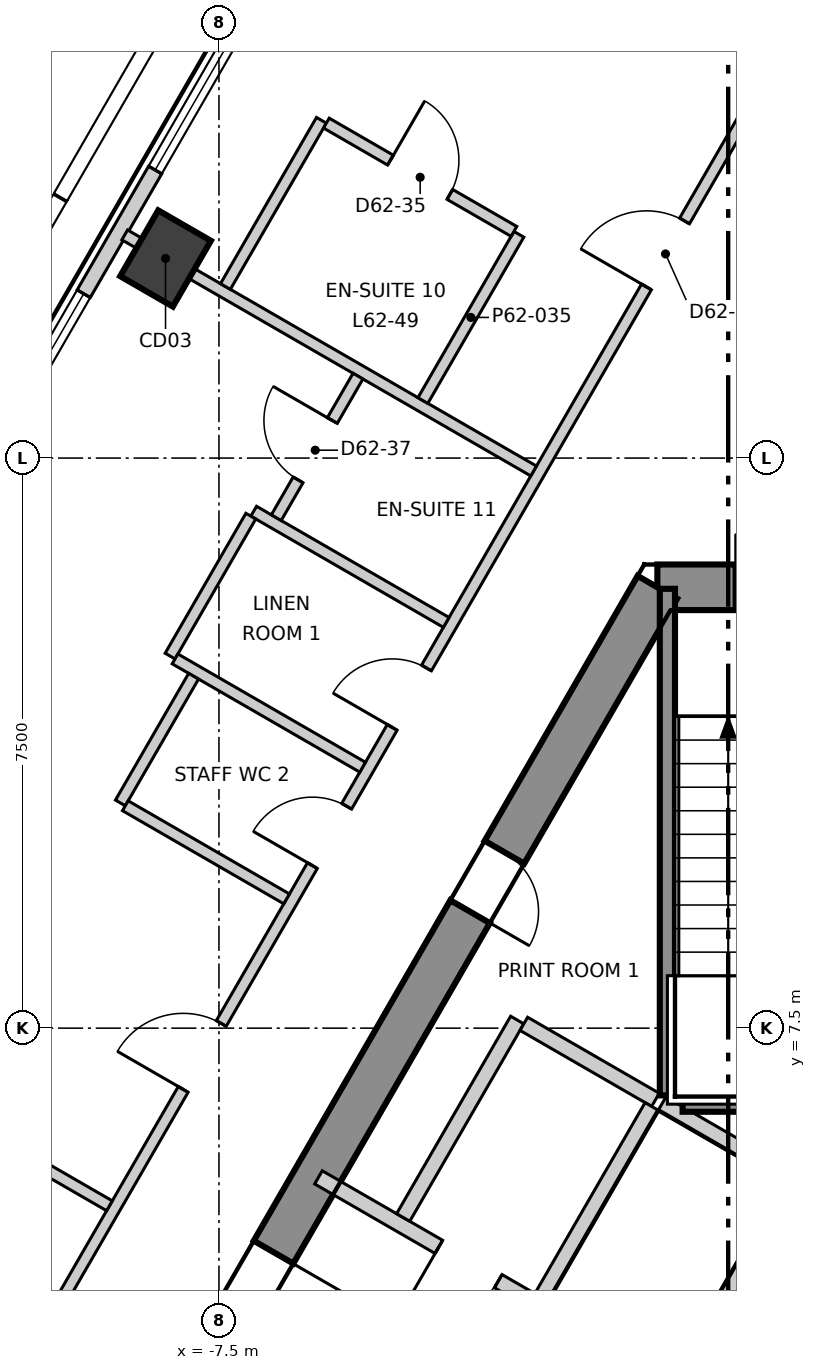
"""IFC4 building model, lengths in metres.
Left out: names, types, materials, properties, quantities, classifications, styles, units other than length and angle.
Written with IfcOpenShell. Run it as: python <this file> out.ifc"""

import sys

from ifc_helpers import new_model, si_unit, direction, frame, frame_2d, origin, origin_2d, place, context, subcontext, project, spatial, polyline, rectangle, outline, extrude, element, fill, save


model = new_model("IFC4")
c1 = context("Model", 3, precision=1e-05, world=origin(), true_north=direction((0.0, 1.0)))
c2 = subcontext(c1, "Body", "Model", "MODEL_VIEW")
j1 = project(units=[si_unit("LENGTHUNIT", "METRE"), si_unit("PLANEANGLEUNIT", "RADIAN")], contexts=[c1])
p1 = place(None, origin())
s1 = spatial("IfcSite", under=j1, at=p1, CompositionType="ELEMENT")
p2 = place(p1, origin())
s2 = spatial("IfcBuilding", under=s1, at=p2, CompositionType="ELEMENT")
p3 = place(p2, frame((0.0, 0.0, 268.3)))
s3 = spatial("IfcBuildingStorey", under=s2, at=p3, CompositionType="ELEMENT", Elevation=268.3)
p4 = place(p3, frame((1.732, 13.3, -0.3), z_axis=(0.0, 0.0, 1.0), x_axis=(-1.0, 0.0, 0.0)))
e1 = element("IfcWall", 1, at=p4, inside=s3, PredefinedType="SHEAR", context=c2, shape_type="SweptSolid", body=[
    extrude(outline(polyline([(-0.173, -0.3), (1.732, -0.3), (3.637, -0.3), (3.291, 0.3), (1.732, 0.3), (0.173, 0.3), (-0.173, -0.3)])), origin(), (0.0, 0.0, 1.0), 3.6),
])
p5 = place(p4, frame((1.032, 0.0, 0.3)))
e2 = element("IfcOpeningElement", 2, at=p5, cuts=e1, PredefinedType="OPENING", context=c2, shape_type="SweptSolid", body=[
    extrude(rectangle(XDim=1.4, YDim=2.1, at=frame_2d((0.7, 1.05))), frame((0.0, 0.31, 0.0), z_axis=(0.0, -1.0, 0.0), x_axis=(1.0, 0.0, 0.0)), (0.0, 0.0, 1.0), 0.62),
])
p6 = place(p3, frame((-1.732, 13.3, -0.3), z_axis=(0.0, 0.0, 1.0), x_axis=(-0.500000539815, -0.866025092122, 0.0)))
e3 = element("IfcWall", 3, at=p6, inside=s3, PredefinedType="SHEAR", context=c2, shape_type="SweptSolid", body=[
    extrude(outline(polyline([(-0.173, -0.3), (1.795, -0.3), (3.763, -0.3), (5.732, -0.3), (7.7, -0.3), (9.668, -0.301), (11.637, -0.301), (13.605, -0.301), (15.573, -0.301), (17.542, -0.301), (19.51, -0.301), (21.478, -0.301), (21.131, 0.3), (19.226, 0.3), (17.321, 0.3), (15.415, 0.3), (13.51, 0.3), (11.605, 0.3), (9.699, 0.3), (7.794, 0.3), (5.889, 0.3), (3.984, 0.3), (2.078, 0.3), (0.173, 0.3), (-0.173, -0.3)])), origin(), (0.0, 0.0, 1.0), 3.6),
])
p7 = place(p6, frame((10.102, 0.0, 0.3)))
e4 = element("IfcOpeningElement", 4, at=p7, cuts=e3, PredefinedType="OPENING", context=c2, shape_type="SweptSolid", body=[
    extrude(rectangle(XDim=1.1, YDim=2.1, at=frame_2d((0.55, 1.05))), frame((0.0, 0.31, 0.0), z_axis=(0.0, -1.0, 0.0), x_axis=(1.0, 0.0, 0.0)), (0.0, 0.0, 1.0), 0.621),
])
p8 = place(p6, frame((16.378, 0.0, 0.3)))
e5 = element("IfcOpeningElement", 5, at=p8, cuts=e3, PredefinedType="OPENING", context=c2, shape_type="SweptSolid", body=[
    extrude(rectangle(XDim=0.9, YDim=2.1, at=frame_2d((0.45, 1.05))), frame((0.0, 0.31, 0.0), z_axis=(0.0, -1.0, 0.0), x_axis=(1.0, 0.0, 0.0)), (0.0, 0.0, 1.0), 0.621),
])
p9 = place(p6, frame((4.026, 0.0, 0.3)))
e6 = element("IfcOpeningElement", 6, at=p9, cuts=e3, PredefinedType="OPENING", context=c2, shape_type="SweptSolid", body=[
    extrude(rectangle(XDim=0.9, YDim=2.1, at=frame_2d((0.45, 1.05))), frame((0.0, 0.31, 0.0), z_axis=(0.0, -1.0, 0.0), x_axis=(1.0, 0.0, 0.0)), (0.0, 0.0, 1.0), 0.621),
])
p10 = place(p3, frame((-8.203, 17.626, -0.3), z_axis=(0.0, 0.0, 1.0), x_axis=(0.5, 0.866025403784, 0.0)))
e7 = element("IfcColumn", 7, at=p10, inside=s3, PredefinedType="COLUMN", context=c2, shape_type="SweptSolid", body=[
    extrude(rectangle(XDim=1.0, YDim=0.8, at=origin_2d()), origin(), (0.0, 0.0, 1.0), 3.6),
])
p11 = place(p3, frame((-2.577, 28.771, 0.0), z_axis=(0.0, 0.0, 1.0), x_axis=(-0.49999909388, -0.866025926932, 0.0)))
e8 = element("IfcWall", 8, at=p11, inside=s3, PredefinedType="ELEMENTEDWALL", context=c2, shape_type="SweptSolid", body=[
    extrude(rectangle(XDim=47.236, YDim=0.2, at=frame_2d((23.618, 0.0))), origin(), (0.0, 0.0, 1.0), 3.3),
])
p12 = place(p11, frame((2.243, 0.0, 0.9)))
e9 = element("IfcOpeningElement", 9, at=p12, cuts=e8, PredefinedType="OPENING", context=c2, shape_type="SweptSolid", body=[
    extrude(rectangle(XDim=3.7, YDim=2.2, at=frame_2d((1.85, 1.1))), frame((0.0, 0.11, 0.0), z_axis=(0.0, -1.0, 0.0), x_axis=(1.0, 0.0, 0.0)), (0.0, 0.0, 1.0), 0.22),
])
p13 = place(p11, frame((7.824, 0.0, 0.9)))
e10 = element("IfcOpeningElement", 10, at=p13, cuts=e8, PredefinedType="OPENING", context=c2, shape_type="SweptSolid", body=[
    extrude(rectangle(XDim=3.7, YDim=2.2, at=frame_2d((1.85, 1.1))), frame((0.0, 0.11, 0.0), z_axis=(0.0, -1.0, 0.0), x_axis=(1.0, 0.0, 0.0)), (0.0, 0.0, 1.0), 0.22),
])
p14 = place(p11, frame((13.406, 0.0, 0.9)))
e11 = element("IfcOpeningElement", 11, at=p14, cuts=e8, PredefinedType="OPENING", context=c2, shape_type="SweptSolid", body=[
    extrude(rectangle(XDim=3.7, YDim=2.2, at=frame_2d((1.85, 1.1))), frame((0.0, 0.11, 0.0), z_axis=(0.0, -1.0, 0.0), x_axis=(1.0, 0.0, 0.0)), (0.0, 0.0, 1.0), 0.22),
])
p15 = place(p11, frame((18.987, 0.0, 0.9)))
e12 = element("IfcOpeningElement", 12, at=p15, cuts=e8, PredefinedType="OPENING", context=c2, shape_type="SweptSolid", body=[
    extrude(rectangle(XDim=3.7, YDim=2.2, at=frame_2d((1.85, 1.1))), frame((0.0, 0.11, 0.0), z_axis=(0.0, -1.0, 0.0), x_axis=(1.0, 0.0, 0.0)), (0.0, 0.0, 1.0), 0.22),
])
p16 = place(p11, frame((24.569, 0.0, 0.9)))
e13 = element("IfcOpeningElement", 13, at=p16, cuts=e8, PredefinedType="OPENING", context=c2, shape_type="SweptSolid", body=[
    extrude(rectangle(XDim=3.7, YDim=2.2, at=frame_2d((1.85, 1.1))), frame((0.0, 0.11, 0.0), z_axis=(0.0, -1.0, 0.0), x_axis=(1.0, 0.0, 0.0)), (0.0, 0.0, 1.0), 0.22),
])
p17 = place(p11, frame((30.15, 0.0, 0.9)))
e14 = element("IfcOpeningElement", 14, at=p17, cuts=e8, PredefinedType="OPENING", context=c2, shape_type="SweptSolid", body=[
    extrude(rectangle(XDim=3.7, YDim=2.2, at=frame_2d((1.85, 1.1))), frame((0.0, 0.11, 0.0), z_axis=(0.0, -1.0, 0.0), x_axis=(1.0, 0.0, 0.0)), (0.0, 0.0, 1.0), 0.22),
])
p18 = place(p11, frame((35.731, 0.0, 0.9)))
e15 = element("IfcOpeningElement", 15, at=p18, cuts=e8, PredefinedType="OPENING", context=c2, shape_type="SweptSolid", body=[
    extrude(rectangle(XDim=3.7, YDim=2.2, at=frame_2d((1.85, 1.1))), frame((0.0, 0.11, 0.0), z_axis=(0.0, -1.0, 0.0), x_axis=(1.0, 0.0, 0.0)), (0.0, 0.0, 1.0), 0.22),
])
p19 = place(p11, frame((41.313, 0.0, 0.9)))
e16 = element("IfcOpeningElement", 16, at=p19, cuts=e8, PredefinedType="OPENING", context=c2, shape_type="SweptSolid", body=[
    extrude(rectangle(XDim=3.7, YDim=2.2, at=frame_2d((1.85, 1.1))), frame((0.0, 0.11, 0.0), z_axis=(0.0, -1.0, 0.0), x_axis=(1.0, 0.0, 0.0)), (0.0, 0.0, 1.0), 0.22),
])
p20 = place(p3, frame((-17.678, -10.12, 0.0), z_axis=(0.0, 0.0, 1.0), x_axis=(0.49998824015, 0.86603219323, 0.0)))
e17 = element("IfcWall", 17, at=p20, inside=s3, PredefinedType="PARTITIONING", context=c2, shape_type="SweptSolid", body=[
    extrude(rectangle(XDim=35.357, YDim=0.15, at=frame_2d((17.678, 0.0))), origin(), (0.0, 0.0, 1.0), 3.3),
])
p21 = place(p20, frame((31.607, 0.0, 0.0)))
e18 = element("IfcOpeningElement", 18, at=p21, cuts=e17, PredefinedType="OPENING", context=c2, shape_type="SweptSolid", body=[
    extrude(rectangle(XDim=1.0, YDim=2.1, at=frame_2d((0.5, 1.05))), frame((0.0, 0.085, 0.0), z_axis=(0.0, -1.0, 0.0), x_axis=(1.0, 0.0, 0.0)), (0.0, 0.0, 1.0), 0.17),
])
p22 = place(p20, frame((19.416, 0.0, 0.0)))
e19 = element("IfcOpeningElement", 19, at=p22, cuts=e17, PredefinedType="OPENING", context=c2, shape_type="SweptSolid", body=[
    extrude(rectangle(XDim=1.0, YDim=2.1, at=frame_2d((0.5, 1.05))), frame((0.0, 0.085, 0.0), z_axis=(0.0, -1.0, 0.0), x_axis=(1.0, 0.0, 0.0)), (0.0, 0.0, 1.0), 0.17),
])
p23 = place(p20, frame((24.916, 0.0, 0.0)))
e20 = element("IfcOpeningElement", 20, at=p23, cuts=e17, PredefinedType="OPENING", context=c2, shape_type="SweptSolid", body=[
    extrude(rectangle(XDim=0.9, YDim=2.1, at=frame_2d((0.45, 1.05))), frame((0.0, 0.085, 0.0), z_axis=(0.0, -1.0, 0.0), x_axis=(1.0, 0.0, 0.0)), (0.0, 0.0, 1.0), 0.17),
])
p24 = place(p20, frame((22.816, 0.0, 0.0)))
e21 = element("IfcOpeningElement", 21, at=p24, cuts=e17, PredefinedType="OPENING", context=c2, shape_type="SweptSolid", body=[
    extrude(rectangle(XDim=0.9, YDim=2.1, at=frame_2d((0.45, 1.05))), frame((0.0, 0.085, 0.0), z_axis=(0.0, -1.0, 0.0), x_axis=(1.0, 0.0, 0.0)), (0.0, 0.0, 1.0), 0.17),
])
p25 = place(p20, frame((14.654, 0.0, 0.0)))
e22 = element("IfcOpeningElement", 22, at=p25, cuts=e17, PredefinedType="OPENING", context=c2, shape_type="SweptSolid", body=[
    extrude(rectangle(XDim=1.0, YDim=2.1, at=frame_2d((0.5, 1.05))), frame((0.0, 0.085, 0.0), z_axis=(0.0, -1.0, 0.0), x_axis=(1.0, 0.0, 0.0)), (0.0, 0.0, 1.0), 0.17),
])
p26 = place(p20, frame((7.672, 0.0, 0.0)))
e23 = element("IfcOpeningElement", 23, at=p26, cuts=e17, PredefinedType="OPENING", context=c2, shape_type="SweptSolid", body=[
    extrude(rectangle(XDim=1.0, YDim=2.1, at=frame_2d((0.5, 1.05))), frame((0.0, 0.085, 0.0), z_axis=(0.0, -1.0, 0.0), x_axis=(1.0, 0.0, 0.0)), (0.0, 0.0, 1.0), 0.17),
])
p27 = place(p20, frame((2.69, 0.0, 0.0)))
e24 = element("IfcOpeningElement", 24, at=p27, cuts=e17, PredefinedType="OPENING", context=c2, shape_type="SweptSolid", body=[
    extrude(rectangle(XDim=1.0, YDim=2.1, at=frame_2d((0.5, 1.05))), frame((0.0, 0.085, 0.0), z_axis=(0.0, -1.0, 0.0), x_axis=(1.0, 0.0, 0.0)), (0.0, 0.0, 1.0), 0.17),
])
p28 = place(p3, frame((-14.321, 8.269, 0.0), z_axis=(0.0, 0.0, 1.0), x_axis=(0.866043575568, -0.499968524226, 0.0)))
e25 = element("IfcWall", 25, at=p28, inside=s3, PredefinedType="PARTITIONING", context=c2, shape_type="SweptSolid", body=[
    extrude(rectangle(XDim=6.212, YDim=0.15, at=frame_2d((3.106, 0.0))), origin(), (0.0, 0.0, 1.0), 2.8),
])
p29 = place(p3, frame((-8.74, 17.936, 0.0), z_axis=(0.0, 0.0, 1.0), x_axis=(0.866033751423, -0.499985541187, 0.0)))
e26 = element("IfcWall", 26, at=p29, inside=s3, PredefinedType="PARTITIONING", context=c2, shape_type="SweptSolid", body=[
    extrude(rectangle(XDim=6.212, YDim=0.15, at=frame_2d((3.106, 0.0))), origin(), (0.0, 0.0, 1.0), 3.3),
])
p30 = place(p3, frame((-7.043, 14.301, 0.0), z_axis=(0.0, 0.0, 1.0), x_axis=(0.865917290158, -0.500187211558, 0.0)))
e27 = element("IfcWall", 27, at=p30, inside=s3, PredefinedType="PARTITIONING", context=c2, shape_type="SweptSolid", body=[
    extrude(rectangle(XDim=2.925, YDim=0.15, at=frame_2d((1.463, 0.0))), origin(), (0.0, 0.0, 1.0), 3.3),
])
p31 = place(p3, frame((-8.143, 12.395, 0.0), z_axis=(0.0, 0.0, 1.0), x_axis=(0.499672732084, 0.866214269573, 0.0)))
e28 = element("IfcWall", 28, at=p31, inside=s3, PredefinedType="PARTITIONING", context=c2, shape_type="SweptSolid", body=[
    extrude(rectangle(XDim=2.125, YDim=0.15, at=frame_2d((1.063, 0.0))), origin(), (0.0, 0.0, 1.0), 3.3),
])
p32 = place(p3, frame((-8.078, 12.358, 0.0), z_axis=(0.0, 0.0, 1.0), x_axis=(0.866020080793, -0.500009219579, 0.0)))
e29 = element("IfcWall", 29, at=p32, inside=s3, PredefinedType="PARTITIONING", context=c2, shape_type="SweptSolid", body=[
    extrude(rectangle(XDim=2.85, YDim=0.15, at=frame_2d((1.425, 0.0))), origin(), (0.0, 0.0, 1.0), 3.3),
])
p33 = place(p3, frame((-8.797, 10.463, 0.0), z_axis=(0.0, 0.0, 1.0), x_axis=(0.500271259635, 0.865868735308, 0.0)))
e30 = element("IfcWall", 30, at=p33, inside=s3, PredefinedType="PARTITIONING", context=c2, shape_type="SweptSolid", body=[
    extrude(rectangle(XDim=1.925, YDim=0.15, at=frame_2d((0.963, 0.0))), origin(), (0.0, 0.0, 1.0), 3.3),
])
p34 = place(p3, frame((-8.732, 10.426, 0.0), z_axis=(0.0, 0.0, 1.0), x_axis=(0.866014668023, -0.500018594424, 0.0)))
e31 = element("IfcWall", 31, at=p34, inside=s3, PredefinedType="PARTITIONING", context=c2, shape_type="SweptSolid", body=[
    extrude(rectangle(XDim=2.45, YDim=0.15, at=frame_2d((1.225, 0.0))), origin(), (0.0, 0.0, 1.0), 3.3),
])
for number, where, z_axis, x_axis in (
    (32, (-4.817, 15.757, 0.0), (0.0, 0.0, 1.0), (0.5, 0.866, 0.0)),
    (33, (-7.415, 17.257, 0.0), (0.0, 0.0, 1.0), (0.5, 0.866, 0.0)),
):
    element("IfcWall", number, at=place(p3, frame(where, z_axis=z_axis, x_axis=x_axis)), inside=s3, PredefinedType="PARTITIONING", context=c2, shape_type="SweptSolid", body=[
        extrude(rectangle(XDim=2.525, YDim=0.15, at=frame_2d((1.263, 0.0))), origin(), (0.0, 0.0, 1.0), 3.3),
    ])
p35 = place(p3, frame((-6.746, 14.216, 0.0), z_axis=(0.0, 0.0, 1.0), x_axis=(0.500095966228, 0.865969990567, 0.0)))
e34 = element("IfcWall", 34, at=p35, inside=s3, PredefinedType="PARTITIONING", context=c2, shape_type="SweptSolid", body=[
    extrude(rectangle(XDim=2.15, YDim=0.15, at=frame_2d((1.075, 0.0))), origin(), (0.0, 0.0, 1.0), 3.3),
])
p36 = place(p35, frame((0.575, 0.0, 0.0)))
e35 = element("IfcOpeningElement", 35, at=p36, cuts=e34, PredefinedType="OPENING", context=c2, shape_type="SweptSolid", body=[
    extrude(rectangle(XDim=0.9, YDim=2.1, at=frame_2d((0.45, 1.05))), frame((0.0, 0.085, 0.0), z_axis=(0.0, -1.0, 0.0), x_axis=(1.0, 0.0, 0.0)), (0.0, 0.0, 1.0), 0.17),
])
p37 = place(p3, frame((-6.087, 19.407, 0.0), z_axis=(0.0, 0.0, 1.0), x_axis=(0.866004402611, -0.500036373335, 0.0)))
e36 = element("IfcWall", 36, at=p37, inside=s3, PredefinedType="PARTITIONING", context=c2, shape_type="SweptSolid", body=[
    extrude(rectangle(XDim=2.85, YDim=0.15, at=frame_2d((1.425, 0.0))), origin(), (0.0, 0.0, 1.0), 3.3),
])
p38 = place(p37, frame((0.975, 0.0, 0.0)))
e37 = element("IfcOpeningElement", 37, at=p38, cuts=e36, PredefinedType="OPENING", context=c2, shape_type="SweptSolid", body=[
    extrude(rectangle(XDim=0.9, YDim=2.1, at=frame_2d((0.45, 1.05))), frame((0.0, 0.085, 0.0), z_axis=(0.0, -1.0, 0.0), x_axis=(1.0, 0.0, 0.0)), (0.0, 0.0, 1.0), 0.17),
])
p39 = place(p3, frame((-6.191, 5.537, 0.0), z_axis=(0.0, 0.0, 1.0), x_axis=(0.866052607023, -0.499952879648, 0.0)))
e38 = element("IfcWall", 38, at=p39, inside=s3, PredefinedType="SOLIDWALL", context=c2, shape_type="SweptSolid", body=[
    extrude(rectangle(XDim=3.332, YDim=0.2, at=frame_2d((1.666, 0.0))), origin(), (0.0, 0.0, 1.0), 3.3),
])
p40 = place(p39, frame((1.83, 0.0, 0.0)))
e39 = element("IfcOpeningElement", 39, at=p40, cuts=e38, PredefinedType="OPENING", context=c2, shape_type="SweptSolid", body=[
    extrude(rectangle(XDim=0.9, YDim=2.1, at=frame_2d((0.45, 1.05))), frame((0.0, 0.11, 0.0), z_axis=(0.0, -1.0, 0.0), x_axis=(1.0, 0.0, 0.0)), (0.0, 0.0, 1.0), 0.22),
])
p41 = place(p3, frame((-5.076, 5.009, 0.0), z_axis=(0.0, 0.0, 1.0), x_axis=(0.50002537861, 0.866010750942, 0.0)))
e40 = element("IfcWall", 40, at=p41, inside=s3, PredefinedType="SOLIDWALL", context=c2, shape_type="SweptSolid", body=[
    extrude(rectangle(XDim=3.0, YDim=0.2, at=frame_2d((1.5, 0.0))), origin(), (0.0, 0.0, 1.0), 3.3),
])
p42 = place(p3, frame((-3.489, 7.557, 0.0), z_axis=(0.0, 0.0, 1.0), x_axis=(0.866010750942, -0.50002537861, 0.0)))
e41 = element("IfcWall", 41, at=p42, inside=s3, PredefinedType="SOLIDWALL", context=c2, shape_type="SweptSolid", body=[
    extrude(rectangle(XDim=2.0, YDim=0.2, at=frame_2d((1.0, 0.0))), origin(), (0.0, 0.0, 1.0), 3.3),
])
p43 = place(p3, frame((-3.257, 3.959, 0.0), z_axis=(0.0, 0.0, 1.0), x_axis=(0.50012328804, 0.865954211699, 0.0)))
e42 = element("IfcWall", 42, at=p43, inside=s3, PredefinedType="SOLIDWALL", context=c2, shape_type="SweptSolid", body=[
    extrude(rectangle(XDim=2.9, YDim=0.2, at=frame_2d((1.45, 0.0))), origin(), (0.0, 0.0, 1.0), 3.3),
])
p44 = place(p3, frame((-1.67, 6.507, 0.0), z_axis=(0.0, 0.0, 1.0), x_axis=(0.865941441609, -0.500145398563, 0.0)))
e43 = element("IfcWall", 43, at=p44, inside=s3, PredefinedType="SOLIDWALL", context=c2, shape_type="SweptSolid", body=[
    extrude(rectangle(XDim=1.815, YDim=0.2, at=frame_2d((0.908, 0.0))), origin(), (0.0, 0.0, 1.0), 3.3),
])
p45 = place(p3, frame((-1.438, 2.909, 0.0), z_axis=(0.0, 0.0, 1.0), x_axis=(0.499829630636, 0.866123744241, 0.0)))
e44 = element("IfcWall", 44, at=p45, inside=s3, PredefinedType="SOLIDWALL", context=c2, shape_type="SweptSolid", body=[
    extrude(rectangle(XDim=2.761, YDim=0.2, at=frame_2d((1.38, 0.0))), origin(), (0.0, 0.0, 1.0), 3.3),
])
p46 = place(p3, frame((-1.4, 6.5, 0.0), z_axis=(0.0, 0.0, 1.0), x_axis=(1.0, 0.0, 0.0)))
e45 = element("IfcWall", 45, at=p46, inside=s3, PredefinedType="SOLIDWALL", context=c2, shape_type="SweptSolid", body=[
    extrude(rectangle(XDim=2.8, YDim=0.2, at=frame_2d((1.4, 0.0))), origin(), (0.0, 0.0, 1.0), 3.3),
])
p47 = place(p3, frame((-1.6, 6.615, 0.0), z_axis=(0.0, 0.0, 1.0), x_axis=(0.0, 1.0, 0.0)))
e46 = element("IfcWall", 46, at=p47, inside=s3, PredefinedType="SOLIDWALL", context=c2, shape_type="SweptSolid", body=[
    extrude(rectangle(XDim=6.665, YDim=0.2, at=frame_2d((3.333, 0.0))), origin(), (0.0, 0.0, 1.0), 3.3),
])
p48 = place(p13, origin())
e47 = element("IfcWindow", 47, at=p48, inside=s3, PartitioningType="SINGLE_PANEL", PredefinedType="WINDOW", context=c2, shape_type="SweptSolid", body=[
    extrude(rectangle(XDim=3.7, YDim=2.2, at=frame_2d((1.85, 1.1))), frame((0.0, 0.03, 0.0), z_axis=(0.0, -1.0, 0.0), x_axis=(1.0, 0.0, 0.0)), (0.0, 0.0, 1.0), 0.06),
])
fill(e10, e47)
p49 = place(p14, origin())
e48 = element("IfcWindow", 48, at=p49, inside=s3, PartitioningType="SINGLE_PANEL", PredefinedType="WINDOW", context=c2, shape_type="SweptSolid", body=[
    extrude(rectangle(XDim=3.7, YDim=2.2, at=frame_2d((1.85, 1.1))), frame((0.0, 0.03, 0.0), z_axis=(0.0, -1.0, 0.0), x_axis=(1.0, 0.0, 0.0)), (0.0, 0.0, 1.0), 0.06),
])
fill(e11, e48)
p50 = place(p40, origin())
e49 = element("IfcDoor", 49, at=p50, inside=s3, OperationType="SINGLE_SWING_LEFT", PredefinedType="DOOR", context=c2, shape_type="SweptSolid", body=[
    extrude(rectangle(XDim=0.9, YDim=2.1, at=frame_2d((0.45, 1.05))), frame((0.0, 0.025, 0.0), z_axis=(0.0, -1.0, 0.0), x_axis=(1.0, 0.0, 0.0)), (0.0, 0.0, 1.0), 0.05),
])
fill(e39, e49)
p51 = place(p21, origin())
e50 = element("IfcDoor", 50, at=p51, inside=s3, OperationType="SINGLE_SWING_RIGHT", PredefinedType="DOOR", context=c2, shape_type="SweptSolid", body=[
    extrude(rectangle(XDim=1.0, YDim=2.1, at=frame_2d((0.5, 1.05))), frame((0.0, 0.025, 0.0), z_axis=(0.0, -1.0, 0.0), x_axis=(1.0, 0.0, 0.0)), (0.0, 0.0, 1.0), 0.05),
])
fill(e18, e50)
p52 = place(p38, origin())
e51 = element("IfcDoor", 51, at=p52, inside=s3, OperationType="SINGLE_SWING_RIGHT", PredefinedType="DOOR", context=c2, shape_type="SweptSolid", body=[
    extrude(rectangle(XDim=0.9, YDim=2.1, at=frame_2d((0.45, 1.05))), frame((0.0, 0.025, 0.0), z_axis=(0.0, -1.0, 0.0), x_axis=(1.0, 0.0, 0.0)), (0.0, 0.0, 1.0), 0.05),
])
fill(e37, e51)
p53 = place(p22, origin())
e52 = element("IfcDoor", 52, at=p53, inside=s3, OperationType="SINGLE_SWING_RIGHT", PredefinedType="DOOR", context=c2, shape_type="SweptSolid", body=[
    extrude(rectangle(XDim=1.0, YDim=2.1, at=frame_2d((0.5, 1.05))), frame((0.0, 0.025, 0.0), z_axis=(0.0, -1.0, 0.0), x_axis=(1.0, 0.0, 0.0)), (0.0, 0.0, 1.0), 0.05),
])
fill(e19, e52)
p54 = place(p36, origin())
e53 = element("IfcDoor", 53, at=p54, inside=s3, OperationType="SINGLE_SWING_LEFT", PredefinedType="DOOR", context=c2, shape_type="SweptSolid", body=[
    extrude(rectangle(XDim=0.9, YDim=2.1, at=frame_2d((0.45, 1.05))), frame((0.0, 0.025, 0.0), z_axis=(0.0, -1.0, 0.0), x_axis=(1.0, 0.0, 0.0)), (0.0, 0.0, 1.0), 0.05),
])
fill(e35, e53)
p55 = place(p23, origin())
e54 = element("IfcDoor", 54, at=p55, inside=s3, OperationType="SINGLE_SWING_RIGHT", PredefinedType="DOOR", context=c2, shape_type="SweptSolid", body=[
    extrude(rectangle(XDim=0.9, YDim=2.1, at=frame_2d((0.45, 1.05))), frame((0.0, 0.025, 0.0), z_axis=(0.0, -1.0, 0.0), x_axis=(1.0, 0.0, 0.0)), (0.0, 0.0, 1.0), 0.05),
])
fill(e20, e54)
p56 = place(p24, origin())
e55 = element("IfcDoor", 55, at=p56, inside=s3, OperationType="SINGLE_SWING_RIGHT", PredefinedType="DOOR", context=c2, shape_type="SweptSolid", body=[
    extrude(rectangle(XDim=0.9, YDim=2.1, at=frame_2d((0.45, 1.05))), frame((0.0, 0.025, 0.0), z_axis=(0.0, -1.0, 0.0), x_axis=(1.0, 0.0, 0.0)), (0.0, 0.0, 1.0), 0.05),
])
fill(e21, e55)
p57 = place(p7, origin())
e56 = element("IfcDoor", 56, at=p57, inside=s3, OperationType="SINGLE_SWING_RIGHT", PredefinedType="DOOR", context=c2, shape_type="SweptSolid", body=[
    extrude(rectangle(XDim=1.1, YDim=2.1, at=frame_2d((0.55, 1.05))), frame((0.0, 0.025, 0.0), z_axis=(0.0, -1.0, 0.0), x_axis=(1.0, 0.0, 0.0)), (0.0, 0.0, 1.0), 0.05),
])
fill(e4, e56)
p58 = place(p9, origin())
e57 = element("IfcDoor", 57, at=p58, inside=s3, OperationType="SINGLE_SWING_LEFT", PredefinedType="DOOR", context=c2, shape_type="SweptSolid", body=[
    extrude(rectangle(XDim=0.9, YDim=2.1, at=frame_2d((0.45, 1.05))), frame((0.0, 0.025, 0.0), z_axis=(0.0, -1.0, 0.0), x_axis=(1.0, 0.0, 0.0)), (0.0, 0.0, 1.0), 0.05),
])
fill(e6, e57)
save(model, sys.argv[1])
